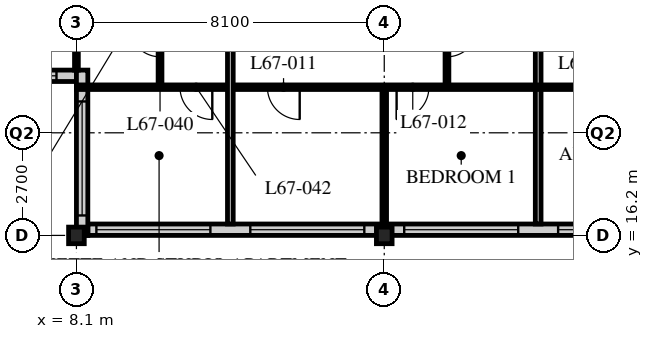
"""IFC4 building model, lengths in metres.
Left out: names, types, materials, properties, quantities, classifications, styles, units other than length and angle.
Written with IfcOpenShell. Run it as: python <this file> out.ifc"""

import sys

from ifc_helpers import new_model, si_unit, direction, frame, frame_2d, origin, origin_2d, place, context, subcontext, project, spatial, rectangle, i_section, extrude, element, fill, save


model = new_model("IFC4")
c1 = context("Model", 3, precision=1e-05, world=origin(), true_north=direction((0.0, 1.0)))
c2 = subcontext(c1, "Body", "Model", "MODEL_VIEW")
j1 = project(units=[si_unit("LENGTHUNIT", "METRE"), si_unit("PLANEANGLEUNIT", "RADIAN")], contexts=[c1])
p1 = place(None, origin())
s1 = spatial("IfcSite", under=j1, at=p1, CompositionType="ELEMENT")
p2 = place(p1, origin())
s2 = spatial("IfcBuilding", under=s1, at=p2, CompositionType="ELEMENT")
p3 = place(p2, frame((0.0, 0.0, 261.9)))
s3 = spatial("IfcBuildingStorey", under=s2, at=p3, CompositionType="ELEMENT", Elevation=261.9)
for number, where, z_axis, x_axis in (
    (1, (8.1, 16.2, 0.0), (0.0, 0.0, 1.0), (1.0, 0.0, 0.0)),
    (2, (16.2, 16.2, 0.0), (0.0, 0.0, 1.0), (1.0, 0.0, 0.0)),
):
    element("IfcColumn", number, at=place(p3, frame(where, z_axis=z_axis, x_axis=x_axis)), inside=s3, PredefinedType="COLUMN", context=c2, shape_type="SweptSolid", body=[
        extrude(i_section(OverallWidth=0.412, OverallDepth=0.437, WebThickness=0.036, FlangeThickness=0.058, FilletRadius=0.015, at=origin_2d()), origin(), (0.0, 0.0, 1.0), 3.9),
    ])
p4 = place(p3, frame((8.4, 16.35, 0.0), z_axis=(0.0, 0.0, 1.0), x_axis=(1.0, 0.0, 0.0)))
e3 = element("IfcWall", 3, at=p4, inside=s3, PredefinedType="SOLIDWALL", context=c2, shape_type="SweptSolid", body=[
    extrude(rectangle(XDim=40.2, YDim=0.3, at=frame_2d((20.1, 0.0))), origin(), (0.0, 0.0, 1.0), 3.69),
])
p5 = place(p4, frame((0.225, 0.0, 0.6)))
e4 = element("IfcOpeningElement", 4, at=p5, cuts=e3, PredefinedType="OPENING", context=c2, shape_type="SweptSolid", body=[
    extrude(rectangle(XDim=3.0, YDim=2.4, at=frame_2d((1.5, 1.2))), frame((0.0, 0.16, 0.0), z_axis=(0.0, -1.0, 0.0), x_axis=(1.0, 0.0, 0.0)), (0.0, 0.0, 1.0), 0.32),
])
p6 = place(p4, frame((4.275, 0.0, 0.6)))
e5 = element("IfcOpeningElement", 5, at=p6, cuts=e3, PredefinedType="OPENING", context=c2, shape_type="SweptSolid", body=[
    extrude(rectangle(XDim=3.0, YDim=2.4, at=frame_2d((1.5, 1.2))), frame((0.0, 0.16, 0.0), z_axis=(0.0, -1.0, 0.0), x_axis=(1.0, 0.0, 0.0)), (0.0, 0.0, 1.0), 0.32),
])
p7 = place(p4, frame((8.325, 0.0, 0.6)))
e6 = element("IfcOpeningElement", 6, at=p7, cuts=e3, PredefinedType="OPENING", context=c2, shape_type="SweptSolid", body=[
    extrude(rectangle(XDim=3.0, YDim=2.4, at=frame_2d((1.5, 1.2))), frame((0.0, 0.16, 0.0), z_axis=(0.0, -1.0, 0.0), x_axis=(1.0, 0.0, 0.0)), (0.0, 0.0, 1.0), 0.32),
])
p8 = place(p4, frame((12.375, 0.0, 0.6)))
e7 = element("IfcOpeningElement", 7, at=p8, cuts=e3, PredefinedType="OPENING", context=c2, shape_type="SweptSolid", body=[
    extrude(rectangle(XDim=3.0, YDim=2.4, at=frame_2d((1.5, 1.2))), frame((0.0, 0.16, 0.0), z_axis=(0.0, -1.0, 0.0), x_axis=(1.0, 0.0, 0.0)), (0.0, 0.0, 1.0), 0.32),
])
p9 = place(p4, frame((16.425, 0.0, 0.6)))
e8 = element("IfcOpeningElement", 8, at=p9, cuts=e3, PredefinedType="OPENING", context=c2, shape_type="SweptSolid", body=[
    extrude(rectangle(XDim=3.0, YDim=2.4, at=frame_2d((1.5, 1.2))), frame((0.0, 0.16, 0.0), z_axis=(0.0, -1.0, 0.0), x_axis=(1.0, 0.0, 0.0)), (0.0, 0.0, 1.0), 0.32),
])
p10 = place(p4, frame((20.475, 0.0, 0.6)))
e9 = element("IfcOpeningElement", 9, at=p10, cuts=e3, PredefinedType="OPENING", context=c2, shape_type="SweptSolid", body=[
    extrude(rectangle(XDim=3.0, YDim=2.4, at=frame_2d((1.5, 1.2))), frame((0.0, 0.16, 0.0), z_axis=(0.0, -1.0, 0.0), x_axis=(1.0, 0.0, 0.0)), (0.0, 0.0, 1.0), 0.32),
])
p11 = place(p4, frame((24.525, 0.0, 0.6)))
e10 = element("IfcOpeningElement", 10, at=p11, cuts=e3, PredefinedType="OPENING", context=c2, shape_type="SweptSolid", body=[
    extrude(rectangle(XDim=3.0, YDim=2.4, at=frame_2d((1.5, 1.2))), frame((0.0, 0.16, 0.0), z_axis=(0.0, -1.0, 0.0), x_axis=(1.0, 0.0, 0.0)), (0.0, 0.0, 1.0), 0.32),
])
p12 = place(p4, frame((28.575, 0.0, 0.6)))
e11 = element("IfcOpeningElement", 11, at=p12, cuts=e3, PredefinedType="OPENING", context=c2, shape_type="SweptSolid", body=[
    extrude(rectangle(XDim=3.0, YDim=2.4, at=frame_2d((1.5, 1.2))), frame((0.0, 0.16, 0.0), z_axis=(0.0, -1.0, 0.0), x_axis=(1.0, 0.0, 0.0)), (0.0, 0.0, 1.0), 0.32),
])
p13 = place(p4, frame((32.625, 0.0, 0.6)))
e12 = element("IfcOpeningElement", 12, at=p13, cuts=e3, PredefinedType="OPENING", context=c2, shape_type="SweptSolid", body=[
    extrude(rectangle(XDim=3.0, YDim=2.4, at=frame_2d((1.5, 1.2))), frame((0.0, 0.16, 0.0), z_axis=(0.0, -1.0, 0.0), x_axis=(1.0, 0.0, 0.0)), (0.0, 0.0, 1.0), 0.32),
])
p14 = place(p4, frame((36.675, 0.0, 0.6)))
e13 = element("IfcOpeningElement", 13, at=p14, cuts=e3, PredefinedType="OPENING", context=c2, shape_type="SweptSolid", body=[
    extrude(rectangle(XDim=3.0, YDim=2.4, at=frame_2d((1.5, 1.2))), frame((0.0, 0.16, 0.0), z_axis=(0.0, -1.0, 0.0), x_axis=(1.0, 0.0, 0.0)), (0.0, 0.0, 1.0), 0.32),
])
p15 = place(p3, frame((4.35, 20.4, 0.0), z_axis=(0.0, 0.0, 1.0), x_axis=(1.0, 0.0, 0.0)))
e14 = element("IfcWall", 14, at=p15, inside=s3, PredefinedType="SOLIDWALL", context=c2, shape_type="SweptSolid", body=[
    extrude(rectangle(XDim=3.75, YDim=0.3, at=frame_2d((1.875, 0.0))), origin(), (0.0, 0.0, 1.0), 3.69),
])
p16 = place(p15, frame((0.225, 0.0, 0.6)))
e15 = element("IfcOpeningElement", 15, at=p16, cuts=e14, PredefinedType="OPENING", context=c2, shape_type="SweptSolid", body=[
    extrude(rectangle(XDim=3.0, YDim=2.3, at=frame_2d((1.5, 1.15))), frame((0.0, 0.16, 0.0), z_axis=(0.0, -1.0, 0.0), x_axis=(1.0, 0.0, 0.0)), (0.0, 0.0, 1.0), 0.32),
])
p17 = place(p3, frame((8.25, 20.55, 0.0), z_axis=(0.0, 0.0, 1.0), x_axis=(0.0, -1.0, 0.0)))
e16 = element("IfcWall", 16, at=p17, inside=s3, PredefinedType="SOLIDWALL", context=c2, shape_type="SweptSolid", body=[
    extrude(rectangle(XDim=4.35, YDim=0.3, at=frame_2d((2.175, 0.0))), origin(), (0.0, 0.0, 1.0), 3.69),
])
p18 = place(p17, frame((0.825, 0.0, 0.6)))
e17 = element("IfcOpeningElement", 17, at=p18, cuts=e16, PredefinedType="OPENING", context=c2, shape_type="SweptSolid", body=[
    extrude(rectangle(XDim=3.0, YDim=2.3, at=frame_2d((1.5, 1.15))), frame((0.0, 0.16, 0.0), z_axis=(0.0, -1.0, 0.0), x_axis=(1.0, 0.0, 0.0)), (0.0, 0.0, 1.0), 0.32),
])
p19 = place(p3, frame((17.85, 22.5, 0.0), z_axis=(0.0, 0.0, 1.0), x_axis=(0.0, -1.0, 0.0)))
e18 = element("IfcWall", 18, at=p19, inside=s3, PredefinedType="PARTITIONING", context=c2, shape_type="SweptSolid", body=[
    extrude(rectangle(XDim=2.4, YDim=0.1, at=frame_2d((1.2, 0.0))), origin(), (0.0, 0.0, 1.0), 3.69),
])
p20 = place(p19, frame((0.8, 0.0, 0.0)))
e19 = element("IfcOpeningElement", 19, at=p20, cuts=e18, PredefinedType="OPENING", context=c2, shape_type="SweptSolid", body=[
    extrude(rectangle(XDim=0.8, YDim=2.1, at=frame_2d((0.4, 1.05))), frame((0.0, 0.06, 0.0), z_axis=(0.0, -1.0, 0.0), x_axis=(1.0, 0.0, 0.0)), (0.0, 0.0, 1.0), 0.12),
])
p21 = place(p3, frame((16.2, 20.1, 0.0), z_axis=(0.0, 0.0, 1.0), x_axis=(0.0, -1.0, 0.0)))
e20 = element("IfcWall", 20, at=p21, inside=s3, PredefinedType="PARTITIONING", context=c2, shape_type="SweptSolid", body=[
    extrude(rectangle(XDim=3.6, YDim=0.12, at=frame_2d((1.8, 0.0))), origin(), (0.0, 0.0, 1.0), 3.078),
])
p22 = place(p3, frame((20.25, 22.5, 0.0), z_axis=(0.0, 0.0, 1.0), x_axis=(0.0, -1.0, 0.0)))
e21 = element("IfcWall", 21, at=p22, inside=s3, PredefinedType="PARTITIONING", context=c2, shape_type="SweptSolid", body=[
    extrude(rectangle(XDim=6.0, YDim=0.15, at=frame_2d((3.0, 0.0))), origin(), (0.0, 0.0, 1.0), 3.69),
])
p23 = place(p3, frame((8.1, 20.1, 0.0), z_axis=(0.0, 0.0, 1.0), x_axis=(1.0, 0.0, 0.0)))
e22 = element("IfcWall", 22, at=p23, inside=s3, PredefinedType="PARTITIONING", context=c2, shape_type="SweptSolid", body=[
    extrude(rectangle(XDim=28.35, YDim=0.12, at=frame_2d((14.175, 0.0))), origin(), (0.0, 0.0, 1.0), 3.69),
])
p24 = place(p23, frame((5.025, 0.0, 0.0)))
e23 = element("IfcOpeningElement", 23, at=p24, cuts=e22, PredefinedType="OPENING", context=c2, shape_type="SweptSolid", body=[
    extrude(rectangle(XDim=0.85, YDim=2.1, at=frame_2d((0.425, 1.05))), frame((0.0, 0.07, 0.0), z_axis=(0.0, -1.0, 0.0), x_axis=(1.0, 0.0, 0.0)), (0.0, 0.0, 1.0), 0.14),
])
p25 = place(p23, frame((8.425, 0.0, 0.0)))
e24 = element("IfcOpeningElement", 24, at=p25, cuts=e22, PredefinedType="OPENING", context=c2, shape_type="SweptSolid", body=[
    extrude(rectangle(XDim=0.85, YDim=2.1, at=frame_2d((0.425, 1.05))), frame((0.0, 0.07, 0.0), z_axis=(0.0, -1.0, 0.0), x_axis=(1.0, 0.0, 0.0)), (0.0, 0.0, 1.0), 0.14),
])
p26 = place(p23, frame((13.125, 0.0, 0.0)))
e25 = element("IfcOpeningElement", 25, at=p26, cuts=e22, PredefinedType="OPENING", context=c2, shape_type="SweptSolid", body=[
    extrude(rectangle(XDim=0.85, YDim=2.1, at=frame_2d((0.425, 1.05))), frame((0.0, 0.07, 0.0), z_axis=(0.0, -1.0, 0.0), x_axis=(1.0, 0.0, 0.0)), (0.0, 0.0, 1.0), 0.14),
])
p27 = place(p23, frame((16.525, 0.0, 0.0)))
e26 = element("IfcOpeningElement", 26, at=p27, cuts=e22, PredefinedType="OPENING", context=c2, shape_type="SweptSolid", body=[
    extrude(rectangle(XDim=0.85, YDim=2.1, at=frame_2d((0.425, 1.05))), frame((0.0, 0.07, 0.0), z_axis=(0.0, -1.0, 0.0), x_axis=(1.0, 0.0, 0.0)), (0.0, 0.0, 1.0), 0.14),
])
p28 = place(p23, frame((21.225, 0.0, 0.0)))
e27 = element("IfcOpeningElement", 27, at=p28, cuts=e22, PredefinedType="OPENING", context=c2, shape_type="SweptSolid", body=[
    extrude(rectangle(XDim=0.85, YDim=2.1, at=frame_2d((0.425, 1.05))), frame((0.0, 0.07, 0.0), z_axis=(0.0, -1.0, 0.0), x_axis=(1.0, 0.0, 0.0)), (0.0, 0.0, 1.0), 0.14),
])
p29 = place(p23, frame((24.625, 0.0, 0.0)))
e28 = element("IfcOpeningElement", 28, at=p29, cuts=e22, PredefinedType="OPENING", context=c2, shape_type="SweptSolid", body=[
    extrude(rectangle(XDim=0.85, YDim=2.1, at=frame_2d((0.425, 1.05))), frame((0.0, 0.07, 0.0), z_axis=(0.0, -1.0, 0.0), x_axis=(1.0, 0.0, 0.0)), (0.0, 0.0, 1.0), 0.14),
])
p30 = place(p23, frame((2.725, 0.0, 0.0)))
e29 = element("IfcOpeningElement", 29, at=p30, cuts=e22, PredefinedType="OPENING", context=c2, shape_type="SweptSolid", body=[
    extrude(rectangle(XDim=0.85, YDim=2.1, at=frame_2d((0.425, 1.05))), frame((0.0, 0.07, 0.0), z_axis=(0.0, -1.0, 0.0), x_axis=(1.0, 0.0, 0.0)), (0.0, 0.0, 1.0), 0.14),
])
p31 = place(p3, frame((10.3, 22.5, 0.0), z_axis=(0.0, 0.0, 1.0), x_axis=(0.0, -1.0, 0.0)))
e30 = element("IfcWall", 30, at=p31, inside=s3, PredefinedType="PARTITIONING", context=c2, shape_type="SweptSolid", body=[
    extrude(rectangle(XDim=2.4, YDim=0.1, at=frame_2d((1.2, 0.0))), origin(), (0.0, 0.0, 1.0), 3.69),
])
p32 = place(p31, frame((0.8, 0.0, 0.0)))
e31 = element("IfcOpeningElement", 31, at=p32, cuts=e30, PredefinedType="OPENING", context=c2, shape_type="SweptSolid", body=[
    extrude(rectangle(XDim=0.8, YDim=2.1, at=frame_2d((0.4, 1.05))), frame((0.0, 0.06, 0.0), z_axis=(0.0, -1.0, 0.0), x_axis=(1.0, 0.0, 0.0)), (0.0, 0.0, 1.0), 0.12),
])
p33 = place(p3, frame((8.1, 22.5, 0.0), z_axis=(0.0, 0.0, 1.0), x_axis=(0.0, -1.0, 0.0)))
e32 = element("IfcWall", 32, at=p33, inside=s3, PredefinedType="PARTITIONING", context=c2, shape_type="SweptSolid", body=[
    extrude(rectangle(XDim=1.95, YDim=0.1, at=frame_2d((0.975, 0.0))), origin(), (0.0, 0.0, 1.0), 3.078),
])
p34 = place(p3, frame((12.15, 22.5, 0.0), z_axis=(0.0, 0.0, 1.0), x_axis=(0.0, -1.0, 0.0)))
e33 = element("IfcWall", 33, at=p34, inside=s3, PredefinedType="PARTITIONING", context=c2, shape_type="SweptSolid", body=[
    extrude(rectangle(XDim=6.0, YDim=0.15, at=frame_2d((3.0, 0.0))), origin(), (0.0, 0.0, 1.0), 3.69),
])
p35 = place(p5, origin())
e34 = element("IfcWindow", 34, at=p35, inside=s3, PartitioningType="SINGLE_PANEL", PredefinedType="WINDOW", context=c2, shape_type="SweptSolid", body=[
    extrude(rectangle(XDim=3.0, YDim=2.4, at=frame_2d((1.5, 1.2))), frame((0.0, 0.03, 0.0), z_axis=(0.0, -1.0, 0.0), x_axis=(1.0, 0.0, 0.0)), (0.0, 0.0, 1.0), 0.06),
])
fill(e4, e34)
p36 = place(p6, origin())
e35 = element("IfcWindow", 35, at=p36, inside=s3, PartitioningType="SINGLE_PANEL", PredefinedType="WINDOW", context=c2, shape_type="SweptSolid", body=[
    extrude(rectangle(XDim=3.0, YDim=2.4, at=frame_2d((1.5, 1.2))), frame((0.0, 0.03, 0.0), z_axis=(0.0, -1.0, 0.0), x_axis=(1.0, 0.0, 0.0)), (0.0, 0.0, 1.0), 0.06),
])
fill(e5, e35)
p37 = place(p7, origin())
e36 = element("IfcWindow", 36, at=p37, inside=s3, PartitioningType="SINGLE_PANEL", PredefinedType="WINDOW", context=c2, shape_type="SweptSolid", body=[
    extrude(rectangle(XDim=3.0, YDim=2.4, at=frame_2d((1.5, 1.2))), frame((0.0, 0.03, 0.0), z_axis=(0.0, -1.0, 0.0), x_axis=(1.0, 0.0, 0.0)), (0.0, 0.0, 1.0), 0.06),
])
fill(e6, e36)
p38 = place(p8, origin())
e37 = element("IfcWindow", 37, at=p38, inside=s3, PartitioningType="SINGLE_PANEL", PredefinedType="WINDOW", context=c2, shape_type="SweptSolid", body=[
    extrude(rectangle(XDim=3.0, YDim=2.4, at=frame_2d((1.5, 1.2))), frame((0.0, 0.03, 0.0), z_axis=(0.0, -1.0, 0.0), x_axis=(1.0, 0.0, 0.0)), (0.0, 0.0, 1.0), 0.06),
])
fill(e7, e37)
p39 = place(p16, origin())
e38 = element("IfcWindow", 38, at=p39, inside=s3, PartitioningType="SINGLE_PANEL", PredefinedType="WINDOW", context=c2, shape_type="SweptSolid", body=[
    extrude(rectangle(XDim=3.0, YDim=2.3, at=frame_2d((1.5, 1.15))), frame((0.0, 0.03, 0.0), z_axis=(0.0, -1.0, 0.0), x_axis=(1.0, 0.0, 0.0)), (0.0, 0.0, 1.0), 0.06),
])
fill(e15, e38)
p40 = place(p18, origin())
e39 = element("IfcWindow", 39, at=p40, inside=s3, PartitioningType="SINGLE_PANEL", PredefinedType="WINDOW", context=c2, shape_type="SweptSolid", body=[
    extrude(rectangle(XDim=3.0, YDim=2.3, at=frame_2d((1.5, 1.15))), frame((0.0, 0.03, 0.0), z_axis=(0.0, -1.0, 0.0), x_axis=(1.0, 0.0, 0.0)), (0.0, 0.0, 1.0), 0.06),
])
fill(e17, e39)
p41 = place(p20, origin())
e40 = element("IfcDoor", 40, at=p41, inside=s3, OperationType="SINGLE_SWING_LEFT", PredefinedType="DOOR", context=c2, shape_type="SweptSolid", body=[
    extrude(rectangle(XDim=0.8, YDim=2.1, at=frame_2d((0.4, 1.05))), frame((0.0, 0.025, 0.0), z_axis=(0.0, -1.0, 0.0), x_axis=(1.0, 0.0, 0.0)), (0.0, 0.0, 1.0), 0.05),
])
fill(e19, e40)
p42 = place(p24, origin())
e41 = element("IfcDoor", 41, at=p42, inside=s3, OperationType="SINGLE_SWING_LEFT", PredefinedType="DOOR", context=c2, shape_type="SweptSolid", body=[
    extrude(rectangle(XDim=0.85, YDim=2.1, at=frame_2d((0.425, 1.05))), frame((0.0, 0.025, 0.0), z_axis=(0.0, -1.0, 0.0), x_axis=(1.0, 0.0, 0.0)), (0.0, 0.0, 1.0), 0.05),
])
fill(e23, e41)
p43 = place(p25, origin())
e42 = element("IfcDoor", 42, at=p43, inside=s3, OperationType="SINGLE_SWING_RIGHT", PredefinedType="DOOR", context=c2, shape_type="SweptSolid", body=[
    extrude(rectangle(XDim=0.85, YDim=2.1, at=frame_2d((0.425, 1.05))), frame((0.0, 0.025, 0.0), z_axis=(0.0, -1.0, 0.0), x_axis=(1.0, 0.0, 0.0)), (0.0, 0.0, 1.0), 0.05),
])
fill(e24, e42)
p44 = place(p32, origin())
e43 = element("IfcDoor", 43, at=p44, inside=s3, OperationType="SINGLE_SWING_RIGHT", PredefinedType="DOOR", context=c2, shape_type="SweptSolid", body=[
    extrude(rectangle(XDim=0.8, YDim=2.1, at=frame_2d((0.4, 1.05))), frame((0.0, 0.025, 0.0), z_axis=(0.0, -1.0, 0.0), x_axis=(1.0, 0.0, 0.0)), (0.0, 0.0, 1.0), 0.05),
])
fill(e31, e43)
p45 = place(p30, origin())
e44 = element("IfcDoor", 44, at=p45, inside=s3, OperationType="SINGLE_SWING_LEFT", PredefinedType="DOOR", context=c2, shape_type="SweptSolid", body=[
    extrude(rectangle(XDim=0.85, YDim=2.1, at=frame_2d((0.425, 1.05))), frame((0.0, 0.025, 0.0), z_axis=(0.0, -1.0, 0.0), x_axis=(1.0, 0.0, 0.0)), (0.0, 0.0, 1.0), 0.05),
])
fill(e29, e44)
save(model, sys.argv[1])
